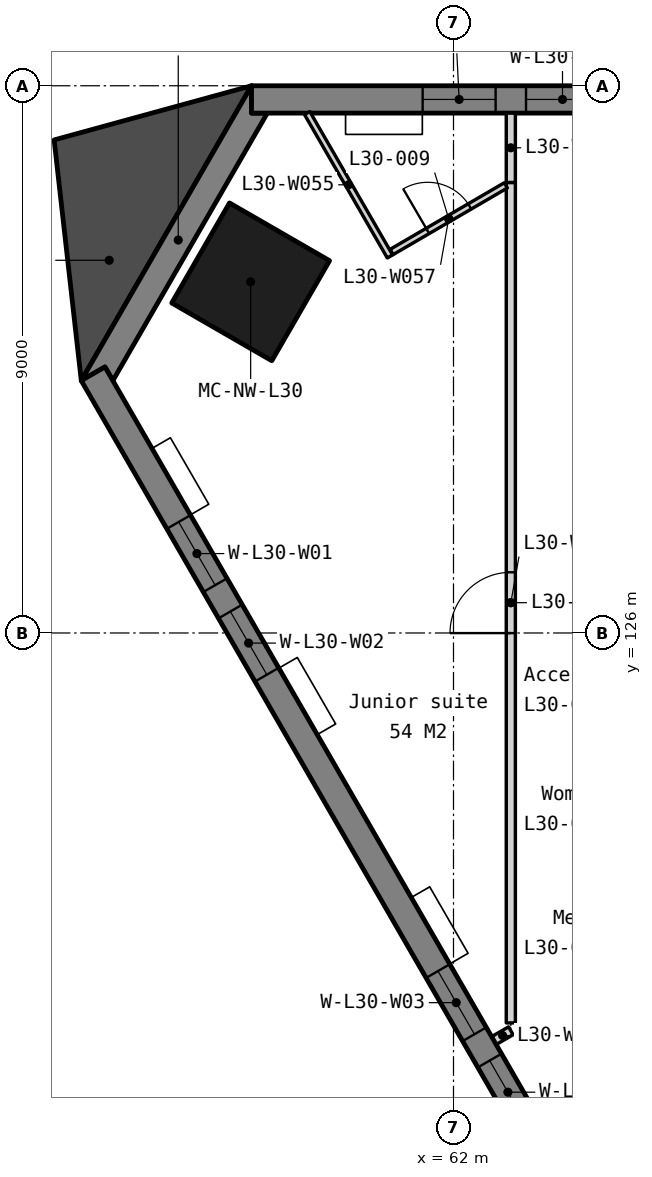
"""IFC4 building model, lengths in metres.
Left out: names, types, materials, properties, quantities, classifications, styles, units other than length and angle.
Written with IfcOpenShell. Run it as: python <this file> out.ifc"""

import sys

from ifc_helpers import new_model, si_unit, direction, frame, frame_2d, origin, origin_2d, place, context, subcontext, project, spatial, polyline, rectangle, outline, extrude, element, fill, save


model = new_model("IFC4")
c1 = context("Model", 3, precision=1e-05, world=origin(), true_north=direction((0.0, 1.0)))
c2 = subcontext(c1, "Body", "Model", "MODEL_VIEW")
j1 = project(units=[si_unit("LENGTHUNIT", "METRE"), si_unit("PLANEANGLEUNIT", "RADIAN")], contexts=[c1])
p1 = place(None, origin())
s1 = spatial("IfcSite", under=j1, at=p1, CompositionType="ELEMENT")
p2 = place(p1, origin())
s2 = spatial("IfcBuilding", under=s1, at=p2, CompositionType="ELEMENT")
p3 = place(p2, frame((0.0, 0.0, 120.3)))
s3 = spatial("IfcBuildingStorey", under=s2, at=p3, CompositionType="ELEMENT", Elevation=120.3)
p4 = place(p3, frame((58.664, 131.775, 0.0), z_axis=(0.0, 0.0, 1.0), x_axis=(-0.5, -0.866025403784, 0.0)))
e1 = element("IfcColumn", 1, at=p4, inside=s3, PredefinedType="COLUMN", context=c2, shape_type="SweptSolid", body=[
    extrude(rectangle(XDim=1.9, YDim=1.9, at=origin_2d()), origin(), (0.0, 0.0, 1.0), 3.5),
])
p5 = place(p3, frame((0.0, 0.0, -0.15)))
e2 = element("IfcWall", 2, at=p5, inside=s3, PredefinedType="SOLIDWALL", context=c2, shape_type="SweptSolid", body=[
    extrude(outline(polyline([(58.678, 135.0), (58.678, 134.55), (58.938, 134.55), (56.398, 130.15), (56.268, 130.375), (55.878, 130.15), (58.678, 135.0)])), origin(), (0.0, 0.0, 1.0), 3.4),
])
p6 = place(p3, frame((101.322, 134.775, -0.15), z_axis=(0.0, 0.0, 1.0), x_axis=(-1.0, 0.0, 0.0)))
e3 = element("IfcWall", 3, at=p6, inside=s3, PredefinedType="SOLIDWALL", context=c2, shape_type="SweptSolid", body=[
    extrude(outline(polyline([(42.643, 0.0), (42.643, 3.4), (0.0, 3.4), (0.0, 0.0), (42.643, 0.0)])), frame((0.0, 0.225, 0.0), z_axis=(0.0, -1.0, 0.0), x_axis=(1.0, 0.0, 0.0)), (0.0, 0.0, 1.0), 0.45),
])
p7 = place(p6, frame((2.814, 0.0, 1.05)))
e4 = element("IfcOpeningElement", 4, at=p7, cuts=e3, PredefinedType="OPENING", context=c2, shape_type="SweptSolid", body=[
    extrude(rectangle(XDim=1.2, YDim=1.5, at=frame_2d((0.6, 0.75))), frame((0.0, 0.235, 0.0), z_axis=(0.0, -1.0, 0.0), x_axis=(1.0, 0.0, 0.0)), (0.0, 0.0, 1.0), 0.47),
])
p8 = place(p6, frame((4.514, 0.0, 1.05)))
e5 = element("IfcOpeningElement", 5, at=p8, cuts=e3, PredefinedType="OPENING", context=c2, shape_type="SweptSolid", body=[
    extrude(rectangle(XDim=1.2, YDim=1.5, at=frame_2d((0.6, 0.75))), frame((0.0, 0.235, 0.0), z_axis=(0.0, -1.0, 0.0), x_axis=(1.0, 0.0, 0.0)), (0.0, 0.0, 1.0), 0.47),
])
p9 = place(p6, frame((11.343, 0.0, 1.05)))
e6 = element("IfcOpeningElement", 6, at=p9, cuts=e3, PredefinedType="OPENING", context=c2, shape_type="SweptSolid", body=[
    extrude(rectangle(XDim=1.2, YDim=1.5, at=frame_2d((0.6, 0.75))), frame((0.0, 0.235, 0.0), z_axis=(0.0, -1.0, 0.0), x_axis=(1.0, 0.0, 0.0)), (0.0, 0.0, 1.0), 0.47),
])
p10 = place(p6, frame((13.043, 0.0, 1.05)))
e7 = element("IfcOpeningElement", 7, at=p10, cuts=e3, PredefinedType="OPENING", context=c2, shape_type="SweptSolid", body=[
    extrude(rectangle(XDim=1.2, YDim=1.5, at=frame_2d((0.6, 0.75))), frame((0.0, 0.235, 0.0), z_axis=(0.0, -1.0, 0.0), x_axis=(1.0, 0.0, 0.0)), (0.0, 0.0, 1.0), 0.47),
])
p11 = place(p6, frame((19.872, 0.0, 1.05)))
e8 = element("IfcOpeningElement", 8, at=p11, cuts=e3, PredefinedType="OPENING", context=c2, shape_type="SweptSolid", body=[
    extrude(rectangle(XDim=1.2, YDim=1.5, at=frame_2d((0.6, 0.75))), frame((0.0, 0.235, 0.0), z_axis=(0.0, -1.0, 0.0), x_axis=(1.0, 0.0, 0.0)), (0.0, 0.0, 1.0), 0.47),
])
p12 = place(p6, frame((21.572, 0.0, 1.05)))
e9 = element("IfcOpeningElement", 9, at=p12, cuts=e3, PredefinedType="OPENING", context=c2, shape_type="SweptSolid", body=[
    extrude(rectangle(XDim=1.2, YDim=1.5, at=frame_2d((0.6, 0.75))), frame((0.0, 0.235, 0.0), z_axis=(0.0, -1.0, 0.0), x_axis=(1.0, 0.0, 0.0)), (0.0, 0.0, 1.0), 0.47),
])
p13 = place(p6, frame((28.4, 0.0, 1.05)))
e10 = element("IfcOpeningElement", 10, at=p13, cuts=e3, PredefinedType="OPENING", context=c2, shape_type="SweptSolid", body=[
    extrude(rectangle(XDim=1.2, YDim=1.5, at=frame_2d((0.6, 0.75))), frame((0.0, 0.235, 0.0), z_axis=(0.0, -1.0, 0.0), x_axis=(1.0, 0.0, 0.0)), (0.0, 0.0, 1.0), 0.47),
])
p14 = place(p6, frame((30.1, 0.0, 1.05)))
e11 = element("IfcOpeningElement", 11, at=p14, cuts=e3, PredefinedType="OPENING", context=c2, shape_type="SweptSolid", body=[
    extrude(rectangle(XDim=1.2, YDim=1.5, at=frame_2d((0.6, 0.75))), frame((0.0, 0.235, 0.0), z_axis=(0.0, -1.0, 0.0), x_axis=(1.0, 0.0, 0.0)), (0.0, 0.0, 1.0), 0.47),
])
p15 = place(p6, frame((36.929, 0.0, 1.05)))
e12 = element("IfcOpeningElement", 12, at=p15, cuts=e3, PredefinedType="OPENING", context=c2, shape_type="SweptSolid", body=[
    extrude(rectangle(XDim=1.2, YDim=1.5, at=frame_2d((0.6, 0.75))), frame((0.0, 0.235, 0.0), z_axis=(0.0, -1.0, 0.0), x_axis=(1.0, 0.0, 0.0)), (0.0, 0.0, 1.0), 0.47),
])
p16 = place(p6, frame((38.629, 0.0, 1.05)))
e13 = element("IfcOpeningElement", 13, at=p16, cuts=e3, PredefinedType="OPENING", context=c2, shape_type="SweptSolid", body=[
    extrude(rectangle(XDim=1.2, YDim=1.5, at=frame_2d((0.6, 0.75))), frame((0.0, 0.235, 0.0), z_axis=(0.0, -1.0, 0.0), x_axis=(1.0, 0.0, 0.0)), (0.0, 0.0, 1.0), 0.47),
])
p17 = place(p3, frame((56.073, 130.263, -0.15), z_axis=(0.0, 0.0, 1.0), x_axis=(0.500000478905, -0.866025127289, 0.0)))
e14 = element("IfcWall", 14, at=p17, inside=s3, PredefinedType="SOLIDWALL", context=c2, shape_type="SweptSolid", body=[
    extrude(outline(polyline([(42.643, 0.0), (42.643, 3.4), (0.0, 3.4), (0.0, 0.0), (42.643, 0.0)])), frame((0.0, 0.225, 0.0), z_axis=(0.0, -1.0, 0.0), x_axis=(1.0, 0.0, 0.0)), (0.0, 0.0, 1.0), 0.45),
])
p18 = place(p17, frame((2.814, 0.0, 1.05)))
e15 = element("IfcOpeningElement", 15, at=p18, cuts=e14, PredefinedType="OPENING", context=c2, shape_type="SweptSolid", body=[
    extrude(rectangle(XDim=1.2, YDim=1.5, at=frame_2d((0.6, 0.75))), frame((0.0, 0.235, 0.0), z_axis=(0.0, -1.0, 0.0), x_axis=(1.0, 0.0, 0.0)), (0.0, 0.0, 1.0), 0.47),
])
p19 = place(p17, frame((4.514, 0.0, 1.05)))
e16 = element("IfcOpeningElement", 16, at=p19, cuts=e14, PredefinedType="OPENING", context=c2, shape_type="SweptSolid", body=[
    extrude(rectangle(XDim=1.2, YDim=1.5, at=frame_2d((0.6, 0.75))), frame((0.0, 0.235, 0.0), z_axis=(0.0, -1.0, 0.0), x_axis=(1.0, 0.0, 0.0)), (0.0, 0.0, 1.0), 0.47),
])
p20 = place(p17, frame((11.343, 0.0, 1.05)))
e17 = element("IfcOpeningElement", 17, at=p20, cuts=e14, PredefinedType="OPENING", context=c2, shape_type="SweptSolid", body=[
    extrude(rectangle(XDim=1.2, YDim=1.5, at=frame_2d((0.6, 0.75))), frame((0.0, 0.235, 0.0), z_axis=(0.0, -1.0, 0.0), x_axis=(1.0, 0.0, 0.0)), (0.0, 0.0, 1.0), 0.47),
])
p21 = place(p17, frame((13.043, 0.0, 1.05)))
e18 = element("IfcOpeningElement", 18, at=p21, cuts=e14, PredefinedType="OPENING", context=c2, shape_type="SweptSolid", body=[
    extrude(rectangle(XDim=1.2, YDim=1.5, at=frame_2d((0.6, 0.75))), frame((0.0, 0.235, 0.0), z_axis=(0.0, -1.0, 0.0), x_axis=(1.0, 0.0, 0.0)), (0.0, 0.0, 1.0), 0.47),
])
p22 = place(p17, frame((19.872, 0.0, 1.05)))
e19 = element("IfcOpeningElement", 19, at=p22, cuts=e14, PredefinedType="OPENING", context=c2, shape_type="SweptSolid", body=[
    extrude(rectangle(XDim=1.2, YDim=1.5, at=frame_2d((0.6, 0.75))), frame((0.0, 0.235, 0.0), z_axis=(0.0, -1.0, 0.0), x_axis=(1.0, 0.0, 0.0)), (0.0, 0.0, 1.0), 0.47),
])
p23 = place(p17, frame((21.572, 0.0, 1.05)))
e20 = element("IfcOpeningElement", 20, at=p23, cuts=e14, PredefinedType="OPENING", context=c2, shape_type="SweptSolid", body=[
    extrude(rectangle(XDim=1.2, YDim=1.5, at=frame_2d((0.6, 0.75))), frame((0.0, 0.235, 0.0), z_axis=(0.0, -1.0, 0.0), x_axis=(1.0, 0.0, 0.0)), (0.0, 0.0, 1.0), 0.47),
])
p24 = place(p17, frame((28.4, 0.0, 1.05)))
e21 = element("IfcOpeningElement", 21, at=p24, cuts=e14, PredefinedType="OPENING", context=c2, shape_type="SweptSolid", body=[
    extrude(rectangle(XDim=1.2, YDim=1.5, at=frame_2d((0.6, 0.75))), frame((0.0, 0.235, 0.0), z_axis=(0.0, -1.0, 0.0), x_axis=(1.0, 0.0, 0.0)), (0.0, 0.0, 1.0), 0.47),
])
p25 = place(p17, frame((30.1, 0.0, 1.05)))
e22 = element("IfcOpeningElement", 22, at=p25, cuts=e14, PredefinedType="OPENING", context=c2, shape_type="SweptSolid", body=[
    extrude(rectangle(XDim=1.2, YDim=1.5, at=frame_2d((0.6, 0.75))), frame((0.0, 0.235, 0.0), z_axis=(0.0, -1.0, 0.0), x_axis=(1.0, 0.0, 0.0)), (0.0, 0.0, 1.0), 0.47),
])
p26 = place(p17, frame((36.929, 0.0, 1.05)))
e23 = element("IfcOpeningElement", 23, at=p26, cuts=e14, PredefinedType="OPENING", context=c2, shape_type="SweptSolid", body=[
    extrude(rectangle(XDim=1.2, YDim=1.5, at=frame_2d((0.6, 0.75))), frame((0.0, 0.235, 0.0), z_axis=(0.0, -1.0, 0.0), x_axis=(1.0, 0.0, 0.0)), (0.0, 0.0, 1.0), 0.47),
])
p27 = place(p17, frame((38.629, 0.0, 1.05)))
e24 = element("IfcOpeningElement", 24, at=p27, cuts=e14, PredefinedType="OPENING", context=c2, shape_type="SweptSolid", body=[
    extrude(rectangle(XDim=1.2, YDim=1.5, at=frame_2d((0.6, 0.75))), frame((0.0, 0.235, 0.0), z_axis=(0.0, -1.0, 0.0), x_axis=(1.0, 0.0, 0.0)), (0.0, 0.0, 1.0), 0.47),
])
p28 = place(p3, frame((0.0, 0.0, -0.15)))
e25 = element("IfcWall", 25, at=p28, inside=s3, PredefinedType="SOLIDWALL", context=c2, shape_type="SweptSolid", body=[
    extrude(outline(polyline([(58.678, 135.0), (55.432, 134.109), (55.878, 130.15), (58.678, 135.0)])), origin(), (0.0, 0.0, 1.0), 3.4),
])
p29 = place(p3, frame((62.673, 119.301, 0.0), z_axis=(0.0, 0.0, 1.0), x_axis=(0.866159461733, 0.499767732902, 0.0)))
e26 = element("IfcWall", 26, at=p29, inside=s3, PredefinedType="PARTITIONING", context=c2, shape_type="SweptSolid", body=[
    extrude(rectangle(XDim=0.311, YDim=0.15, at=frame_2d((0.156, 0.0))), origin(), (0.0, 0.0, 1.0), 3.25),
])
p30 = place(p3, frame((62.943, 119.587, 0.0), z_axis=(0.0, 0.0, 1.0), x_axis=(0.0, 1.0, 0.0)))
e27 = element("IfcWall", 27, at=p30, inside=s3, PredefinedType="PARTITIONING", context=c2, shape_type="SweptSolid", body=[
    extrude(rectangle(XDim=13.823, YDim=0.15, at=frame_2d((6.911, 0.0))), origin(), (0.0, 0.0, 1.0), 3.25),
])
p31 = place(p30, frame((6.411, 0.0, 0.0)))
e28 = element("IfcOpeningElement", 28, at=p31, cuts=e27, PredefinedType="OPENING", context=c2, shape_type="SweptSolid", body=[
    extrude(rectangle(XDim=1.0, YDim=2.1, at=frame_2d((0.5, 1.05))), frame((0.0, 0.085, 0.0), z_axis=(0.0, -1.0, 0.0), x_axis=(1.0, 0.0, 0.0)), (0.0, 0.0, 1.0), 0.17),
])
p32 = place(p3, frame((59.594, 134.55, 0.0), z_axis=(0.0, 0.0, 1.0), x_axis=(0.499939847306, -0.866060130173, 0.0)))
e29 = element("IfcWall", 29, at=p32, inside=s3, PredefinedType="PARTITIONING", context=c2, shape_type="SweptSolid", body=[
    extrude(rectangle(XDim=2.722, YDim=0.1, at=frame_2d((1.361, 0.0))), origin(), (0.0, 0.0, 1.0), 3.25),
])
p33 = place(p3, frame((60.982, 132.266, 0.0), z_axis=(0.0, 0.0, 1.0), x_axis=(0.863864394537, 0.503724436425, 0.0)))
e30 = element("IfcWall", 30, at=p33, inside=s3, PredefinedType="PARTITIONING", context=c2, shape_type="SweptSolid", body=[
    extrude(rectangle(XDim=2.175, YDim=0.1, at=frame_2d((1.087, 0.0))), origin(), (0.0, 0.0, 1.0), 3.25),
])
p34 = place(p33, frame((0.687, 0.0, 0.0)))
e31 = element("IfcOpeningElement", 31, at=p34, cuts=e30, PredefinedType="OPENING", context=c2, shape_type="SweptSolid", body=[
    extrude(rectangle(XDim=0.8, YDim=2.1, at=frame_2d((0.4, 1.05))), frame((0.0, 0.06, 0.0), z_axis=(0.0, -1.0, 0.0), x_axis=(1.0, 0.0, 0.0)), (0.0, 0.0, 1.0), 0.12),
])
p35 = place(p3, frame((62.943, 133.409, 0.0), z_axis=(0.0, 0.0, 1.0), x_axis=(0.0, 1.0, 0.0)))
e32 = element("IfcWall", 32, at=p35, inside=s3, PredefinedType="PARTITIONING", context=c2, shape_type="SweptSolid", body=[
    extrude(rectangle(XDim=1.141, YDim=0.15, at=frame_2d((0.57, 0.0))), origin(), (0.0, 0.0, 1.0), 3.25),
])
p36 = place(p15, origin())
e33 = element("IfcWindow", 33, at=p36, inside=s3, PartitioningType="SINGLE_PANEL", PredefinedType="WINDOW", context=c2, shape_type="SweptSolid", body=[
    extrude(rectangle(XDim=1.2, YDim=1.5, at=frame_2d((0.6, 0.75))), frame((0.0, 0.03, 0.0), z_axis=(0.0, -1.0, 0.0), x_axis=(1.0, 0.0, 0.0)), (0.0, 0.0, 1.0), 0.06),
])
fill(e12, e33)
p37 = place(p16, origin())
e34 = element("IfcWindow", 34, at=p37, inside=s3, PartitioningType="SINGLE_PANEL", PredefinedType="WINDOW", context=c2, shape_type="SweptSolid", body=[
    extrude(rectangle(XDim=1.2, YDim=1.5, at=frame_2d((0.6, 0.75))), frame((0.0, 0.03, 0.0), z_axis=(0.0, -1.0, 0.0), x_axis=(1.0, 0.0, 0.0)), (0.0, 0.0, 1.0), 0.06),
])
fill(e13, e34)
p38 = place(p18, origin())
e35 = element("IfcWindow", 35, at=p38, inside=s3, PartitioningType="SINGLE_PANEL", PredefinedType="WINDOW", context=c2, shape_type="SweptSolid", body=[
    extrude(rectangle(XDim=1.2, YDim=1.5, at=frame_2d((0.6, 0.75))), frame((0.0, 0.03, 0.0), z_axis=(0.0, -1.0, 0.0), x_axis=(1.0, 0.0, 0.0)), (0.0, 0.0, 1.0), 0.06),
])
fill(e15, e35)
p39 = place(p19, origin())
e36 = element("IfcWindow", 36, at=p39, inside=s3, PartitioningType="SINGLE_PANEL", PredefinedType="WINDOW", context=c2, shape_type="SweptSolid", body=[
    extrude(rectangle(XDim=1.2, YDim=1.5, at=frame_2d((0.6, 0.75))), frame((0.0, 0.03, 0.0), z_axis=(0.0, -1.0, 0.0), x_axis=(1.0, 0.0, 0.0)), (0.0, 0.0, 1.0), 0.06),
])
fill(e16, e36)
p40 = place(p20, origin())
e37 = element("IfcWindow", 37, at=p40, inside=s3, PartitioningType="SINGLE_PANEL", PredefinedType="WINDOW", context=c2, shape_type="SweptSolid", body=[
    extrude(rectangle(XDim=1.2, YDim=1.5, at=frame_2d((0.6, 0.75))), frame((0.0, 0.03, 0.0), z_axis=(0.0, -1.0, 0.0), x_axis=(1.0, 0.0, 0.0)), (0.0, 0.0, 1.0), 0.06),
])
fill(e17, e37)
p41 = place(p21, origin())
e38 = element("IfcWindow", 38, at=p41, inside=s3, PartitioningType="SINGLE_PANEL", PredefinedType="WINDOW", context=c2, shape_type="SweptSolid", body=[
    extrude(rectangle(XDim=1.2, YDim=1.5, at=frame_2d((0.6, 0.75))), frame((0.0, 0.03, 0.0), z_axis=(0.0, -1.0, 0.0), x_axis=(1.0, 0.0, 0.0)), (0.0, 0.0, 1.0), 0.06),
])
fill(e18, e38)
p42 = place(p31, origin())
e39 = element("IfcDoor", 39, at=p42, inside=s3, OperationType="SINGLE_SWING_LEFT", PredefinedType="DOOR", context=c2, shape_type="SweptSolid", body=[
    extrude(rectangle(XDim=1.0, YDim=2.1, at=frame_2d((0.5, 1.05))), frame((0.0, 0.025, 0.0), z_axis=(0.0, -1.0, 0.0), x_axis=(1.0, 0.0, 0.0)), (0.0, 0.0, 1.0), 0.05),
])
fill(e28, e39)
p43 = place(p34, origin())
e40 = element("IfcDoor", 40, at=p43, inside=s3, OperationType="SINGLE_SWING_LEFT", PredefinedType="DOOR", context=c2, shape_type="SweptSolid", body=[
    extrude(rectangle(XDim=0.8, YDim=2.1, at=frame_2d((0.4, 1.05))), frame((0.0, 0.025, 0.0), z_axis=(0.0, -1.0, 0.0), x_axis=(1.0, 0.0, 0.0)), (0.0, 0.0, 1.0), 0.05),
])
fill(e31, e40)
save(model, sys.argv[1])
